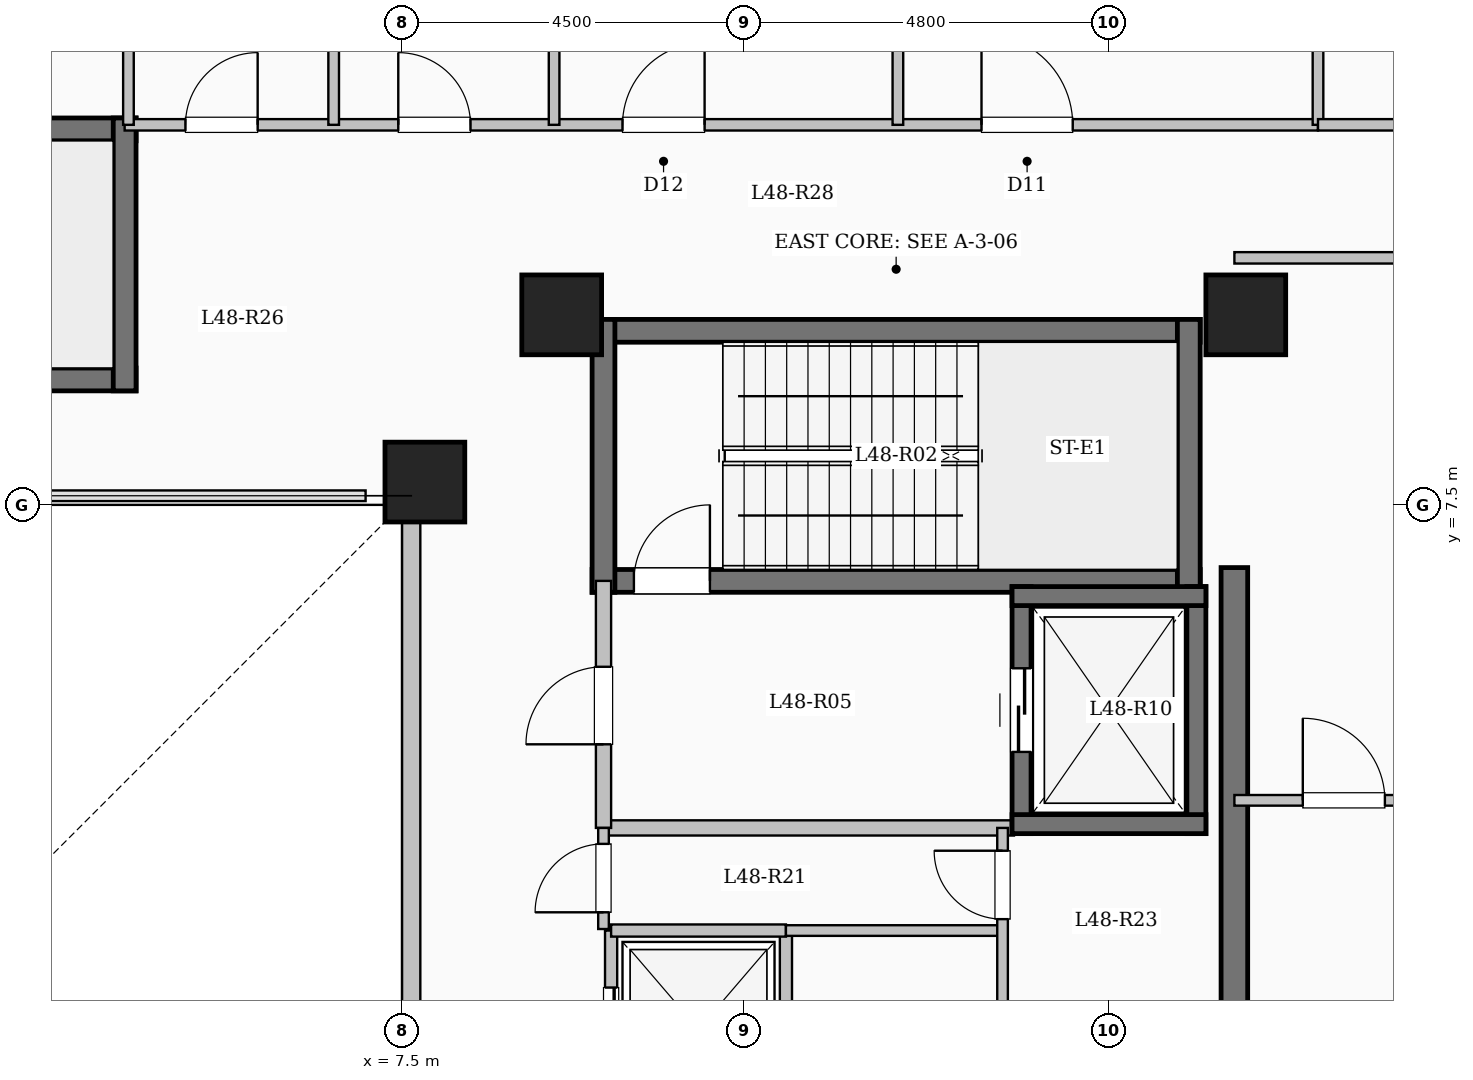
"""IFC4 building model, lengths in metres.
Left out: names, types, materials, properties, quantities, classifications, styles, units other than length and angle.
Written with IfcOpenShell. Run it as: python <this file> out.ifc"""

import sys

from ifc_helpers import new_model, si_unit, direction, frame, frame_2d, origin, origin_2d, place, context, subcontext, project, spatial, rectangle, extrude, element, fill, save


model = new_model("IFC4")
c1 = context("Model", 3, precision=1e-05, world=origin(), true_north=direction((0.0, 1.0)))
c2 = subcontext(c1, "Body", "Model", "MODEL_VIEW")
j1 = project(units=[si_unit("LENGTHUNIT", "METRE"), si_unit("PLANEANGLEUNIT", "RADIAN")], contexts=[c1])
p1 = place(None, origin())
s1 = spatial("IfcSite", under=j1, at=p1, CompositionType="ELEMENT")
p2 = place(p1, origin())
s2 = spatial("IfcBuilding", under=s1, at=p2, CompositionType="ELEMENT")
p3 = place(p2, frame((0.0, 0.0, 177.3)))
s3 = spatial("IfcBuildingStorey", under=s2, at=p3, CompositionType="ELEMENT", Elevation=177.3)
for number, where, z_axis, x_axis in (
    (1, (7.8, 7.8, 0.0), (0.0, 0.0, 1.0), (1.0, 0.0, 0.0)),
    (2, (9.6, 10.0, 0.0), (0.0, 0.0, 1.0), (1.0, 0.0, 0.0)),
    (3, (18.6, 10.0, 0.0), (0.0, 0.0, 1.0), (1.0, 0.0, 0.0)),
):
    element("IfcColumn", number, at=place(p3, frame(where, z_axis=z_axis, x_axis=x_axis)), inside=s3, PredefinedType="COLUMN", context=c2, shape_type="SweptSolid", body=[
        extrude(rectangle(XDim=1.05, YDim=1.05, at=origin_2d()), origin(), (0.0, 0.0, 1.0), 4.5),
    ])
p4 = place(p3, frame((7.62, -7.62, 0.0), z_axis=(0.0, 0.0, 1.0), x_axis=(0.0, 1.0, 0.0)))
e4 = element("IfcWall", 4, at=p4, inside=s3, PredefinedType="SOLIDWALL", context=c2, shape_type="SweptSolid", body=[
    extrude(rectangle(XDim=15.24, YDim=0.24, at=frame_2d((7.62, 0.0))), origin(), (0.0, 0.0, 1.0), 4.2),
])
p5 = place(p4, frame((6.92, 0.0, 0.95)))
e5 = element("IfcOpeningElement", 5, at=p5, cuts=e4, PredefinedType="OPENING", context=c2, shape_type="SweptSolid", body=[
    extrude(rectangle(XDim=1.4, YDim=1.5, at=frame_2d((0.7, 0.75))), frame((0.0, 0.13, 0.0), z_axis=(0.0, -1.0, 0.0), x_axis=(1.0, 0.0, 0.0)), (0.0, 0.0, 1.0), 0.26),
])
p6 = place(p3, frame((10.0, 9.79, 0.0), z_axis=(0.0, 0.0, 1.0), x_axis=(1.0, 0.0, 0.0)))
e6 = element("IfcWall", 6, at=p6, inside=s3, PredefinedType="SHEAR", context=c2, shape_type="SweptSolid", body=[
    extrude(rectangle(XDim=8.0, YDim=0.3, at=frame_2d((4.0, 0.0))), origin(), (0.0, 0.0, 1.0), 4.5),
])
p7 = place(p3, frame((10.0, 6.5, 0.0), z_axis=(0.0, 0.0, 1.0), x_axis=(1.0, 0.0, 0.0)))
e7 = element("IfcWall", 7, at=p7, inside=s3, PredefinedType="SHEAR", context=c2, shape_type="SweptSolid", body=[
    extrude(rectangle(XDim=8.0, YDim=0.3, at=frame_2d((4.0, 0.0))), origin(), (0.0, 0.0, 1.0), 4.5),
])
p8 = place(p7, frame((0.55, 0.0, 0.0)))
e8 = element("IfcOpeningElement", 8, at=p8, cuts=e7, PredefinedType="OPENING", context=c2, shape_type="SweptSolid", body=[
    extrude(rectangle(XDim=1.0, YDim=2.15, at=frame_2d((0.5, 1.075))), frame((0.0, 0.16, 0.0), z_axis=(0.0, -1.0, 0.0), x_axis=(1.0, 0.0, 0.0)), (0.0, 0.0, 1.0), 0.32),
])
for number, where, z_axis, x_axis in (
    (9, (10.15, 6.35, 0.0), (0.0, 0.0, 1.0), (0.0, 1.0, 0.0)),
    (10, (17.85, 6.35, 0.0), (0.0, 0.0, 1.0), (0.0, 1.0, 0.0)),
):
    element("IfcWall", number, at=place(p3, frame(where, z_axis=z_axis, x_axis=x_axis)), inside=s3, PredefinedType="SHEAR", context=c2, shape_type="SweptSolid", body=[
        extrude(rectangle(XDim=3.59, YDim=0.3, at=frame_2d((1.795, 0.0))), origin(), (0.0, 0.0, 1.0), 4.5),
    ])
p9 = place(p3, frame((-4.0, 12.44, 0.0), z_axis=(0.0, 0.0, 1.0), x_axis=(1.0, 0.0, 0.0)))
e11 = element("IfcWall", 11, at=p9, inside=s3, PredefinedType="SHEAR", context=c2, shape_type="SweptSolid", body=[
    extrude(rectangle(XDim=8.0, YDim=0.3, at=frame_2d((4.0, 0.0))), origin(), (0.0, 0.0, 1.0), 4.5),
])
p10 = place(p3, frame((-4.0, 9.15, 0.0), z_axis=(0.0, 0.0, 1.0), x_axis=(1.0, 0.0, 0.0)))
e12 = element("IfcWall", 12, at=p10, inside=s3, PredefinedType="SHEAR", context=c2, shape_type="SweptSolid", body=[
    extrude(rectangle(XDim=8.0, YDim=0.3, at=frame_2d((4.0, 0.0))), origin(), (0.0, 0.0, 1.0), 4.5),
])
p11 = place(p10, frame((0.55, 0.0, 0.0)))
e13 = element("IfcOpeningElement", 13, at=p11, cuts=e12, PredefinedType="OPENING", context=c2, shape_type="SweptSolid", body=[
    extrude(rectangle(XDim=1.0, YDim=2.15, at=frame_2d((0.5, 1.075))), frame((0.0, 0.16, 0.0), z_axis=(0.0, -1.0, 0.0), x_axis=(1.0, 0.0, 0.0)), (0.0, 0.0, 1.0), 0.32),
])
p12 = place(p3, frame((3.85, 9.0, 0.0), z_axis=(0.0, 0.0, 1.0), x_axis=(0.0, 1.0, 0.0)))
e14 = element("IfcWall", 14, at=p12, inside=s3, PredefinedType="SHEAR", context=c2, shape_type="SweptSolid", body=[
    extrude(rectangle(XDim=3.59, YDim=0.3, at=frame_2d((1.795, 0.0))), origin(), (0.0, 0.0, 1.0), 4.5),
])
p13 = place(p3, frame((10.15, 3.25, 0.0), z_axis=(0.0, 0.0, 1.0), x_axis=(1.0, 0.0, 0.0)))
e15 = element("IfcWall", 15, at=p13, inside=s3, PredefinedType="SOLIDWALL", context=c2, shape_type="SweptSolid", body=[
    extrude(rectangle(XDim=5.4, YDim=0.2, at=frame_2d((2.7, 0.0))), origin(), (0.0, 0.0, 1.0), 4.2),
])
p14 = place(p3, frame((10.15, 3.25, 0.0), z_axis=(0.0, 0.0, 1.0), x_axis=(0.0, 1.0, 0.0)))
e16 = element("IfcWall", 16, at=p14, inside=s3, PredefinedType="SOLIDWALL", context=c2, shape_type="SweptSolid", body=[
    extrude(rectangle(XDim=3.25, YDim=0.2, at=frame_2d((1.625, 0.0))), origin(), (0.0, 0.0, 1.0), 4.2),
])
p15 = place(p14, frame((1.1, 0.0, 0.0)))
e17 = element("IfcOpeningElement", 17, at=p15, cuts=e16, PredefinedType="OPENING", context=c2, shape_type="SweptSolid", body=[
    extrude(rectangle(XDim=1.02, YDim=2.15, at=frame_2d((0.51, 1.075))), frame((0.0, 0.11, 0.0), z_axis=(0.0, -1.0, 0.0), x_axis=(1.0, 0.0, 0.0)), (0.0, 0.0, 1.0), 0.22),
])
p16 = place(p3, frame((15.65, 3.175, 0.0), z_axis=(0.0, 0.0, 1.0), x_axis=(0.0, 1.0, 0.0)))
e18 = element("IfcWall", 18, at=p16, inside=s3, PredefinedType="SHEAR", context=c2, shape_type="SweptSolid", body=[
    extrude(rectangle(XDim=3.25, YDim=0.25, at=frame_2d((1.625, 0.0))), origin(), (0.0, 0.0, 1.0), 4.5),
])
p17 = place(p16, frame((1.075, 0.0, 0.0)))
e19 = element("IfcOpeningElement", 19, at=p17, cuts=e18, PredefinedType="OPENING", context=c2, shape_type="SweptSolid", body=[
    extrude(rectangle(XDim=1.1, YDim=2.15, at=frame_2d((0.55, 1.075))), frame((0.0, 0.135, 0.0), z_axis=(0.0, -1.0, 0.0), x_axis=(1.0, 0.0, 0.0)), (0.0, 0.0, 1.0), 0.27),
])
p18 = place(p3, frame((17.95, 3.175, 0.0), z_axis=(0.0, 0.0, 1.0), x_axis=(0.0, 1.0, 0.0)))
e20 = element("IfcWall", 20, at=p18, inside=s3, PredefinedType="SHEAR", context=c2, shape_type="SweptSolid", body=[
    extrude(rectangle(XDim=3.25, YDim=0.25, at=frame_2d((1.625, 0.0))), origin(), (0.0, 0.0, 1.0), 4.5),
])
for number, where, z_axis, x_axis in (
    (21, (15.525, 3.3, 0.0), (0.0, 0.0, 1.0), (1.0, 0.0, 0.0)),
    (22, (15.525, 6.3, 0.0), (0.0, 0.0, 1.0), (1.0, 0.0, 0.0)),
):
    element("IfcWall", number, at=place(p3, frame(where, z_axis=z_axis, x_axis=x_axis)), inside=s3, PredefinedType="SHEAR", context=c2, shape_type="SweptSolid", body=[
        extrude(rectangle(XDim=2.55, YDim=0.25, at=frame_2d((1.275, 0.0))), origin(), (0.0, 0.0, 1.0), 4.5),
    ])
p19 = place(p3, frame((10.25, -0.7, 0.0), z_axis=(0.0, 0.0, 1.0), x_axis=(0.0, 1.0, 0.0)))
e23 = element("IfcWall", 23, at=p19, inside=s3, PredefinedType="SOLIDWALL", context=c2, shape_type="SweptSolid", body=[
    extrude(rectangle(XDim=2.6, YDim=0.16, at=frame_2d((1.3, 0.0))), origin(), (0.0, 0.0, 1.0), 4.2),
])
p20 = place(p19, frame((0.75, 0.0, 0.0)))
e24 = element("IfcOpeningElement", 24, at=p20, cuts=e23, PredefinedType="OPENING", context=c2, shape_type="SweptSolid", body=[
    extrude(rectangle(XDim=1.1, YDim=2.15, at=frame_2d((0.55, 1.075))), frame((0.0, 0.09, 0.0), z_axis=(0.0, -1.0, 0.0), x_axis=(1.0, 0.0, 0.0)), (0.0, 0.0, 1.0), 0.18),
])
p21 = place(p3, frame((12.55, -0.7, 0.0), z_axis=(0.0, 0.0, 1.0), x_axis=(0.0, 1.0, 0.0)))
e25 = element("IfcWall", 25, at=p21, inside=s3, PredefinedType="SOLIDWALL", context=c2, shape_type="SweptSolid", body=[
    extrude(rectangle(XDim=2.6, YDim=0.16, at=frame_2d((1.3, 0.0))), origin(), (0.0, 0.0, 1.0), 4.2),
])
p22 = place(p3, frame((10.25, 1.9, 0.0), z_axis=(0.0, 0.0, 1.0), x_axis=(1.0, 0.0, 0.0)))
e26 = element("IfcWall", 26, at=p22, inside=s3, PredefinedType="SOLIDWALL", context=c2, shape_type="SweptSolid", body=[
    extrude(rectangle(XDim=2.3, YDim=0.16, at=frame_2d((1.15, 0.0))), origin(), (0.0, 0.0, 1.0), 4.2),
])
p23 = place(p3, frame((18.45, -7.375, 0.0), z_axis=(0.0, 0.0, 1.0), x_axis=(0.0, 1.0, 0.0)))
e27 = element("IfcWall", 27, at=p23, inside=s3, PredefinedType="SHEAR", context=c2, shape_type="SweptSolid", body=[
    extrude(rectangle(XDim=14.05, YDim=0.35, at=frame_2d((7.025, 0.0))), origin(), (0.0, 0.0, 1.0), 4.5),
])
p24 = place(p3, frame((12.55, 1.9, 0.0), z_axis=(0.0, 0.0, 1.0), x_axis=(1.0, 0.0, 0.0)))
e28 = element("IfcWall", 28, at=p24, inside=s3, PredefinedType="PARTITIONING", context=c2, shape_type="SweptSolid", body=[
    extrude(rectangle(XDim=2.85, YDim=0.14, at=frame_2d((1.425, 0.0))), origin(), (0.0, 0.0, 1.0), 4.2),
])
p25 = place(p3, frame((10.15, 1.92, 0.0), z_axis=(0.0, 0.0, 1.0), x_axis=(0.0, 1.0, 0.0)))
e29 = element("IfcWall", 29, at=p25, inside=s3, PredefinedType="PARTITIONING", context=c2, shape_type="SweptSolid", body=[
    extrude(rectangle(XDim=1.33, YDim=0.14, at=frame_2d((0.665, 0.0))), origin(), (0.0, 0.0, 1.0), 4.2),
])
p26 = place(p25, frame((0.22, 0.0, 0.0)))
e30 = element("IfcOpeningElement", 30, at=p26, cuts=e29, PredefinedType="OPENING", context=c2, shape_type="SweptSolid", body=[
    extrude(rectangle(XDim=0.9, YDim=2.08, at=frame_2d((0.45, 1.04))), frame((0.0, 0.08, 0.0), z_axis=(0.0, -1.0, 0.0), x_axis=(1.0, 0.0, 0.0)), (0.0, 0.0, 1.0), 0.16),
])
p27 = place(p3, frame((15.4, -7.2, 0.0), z_axis=(0.0, 0.0, 1.0), x_axis=(0.0, 1.0, 0.0)))
e31 = element("IfcWall", 31, at=p27, inside=s3, PredefinedType="PARTITIONING", context=c2, shape_type="SweptSolid", body=[
    extrude(rectangle(XDim=10.45, YDim=0.14, at=frame_2d((5.225, 0.0))), origin(), (0.0, 0.0, 1.0), 4.2),
])
p28 = place(p27, frame((9.25, 0.0, 0.0)))
e32 = element("IfcOpeningElement", 32, at=p28, cuts=e31, PredefinedType="OPENING", context=c2, shape_type="SweptSolid", body=[
    extrude(rectangle(XDim=0.9, YDim=2.08, at=frame_2d((0.45, 1.04))), frame((0.0, 0.08, 0.0), z_axis=(0.0, -1.0, 0.0), x_axis=(1.0, 0.0, 0.0)), (0.0, 0.0, 1.0), 0.16),
])
p29 = place(p3, frame((3.85, 12.5, 0.0), z_axis=(0.0, 0.0, 1.0), x_axis=(1.0, 0.0, 0.0)))
e33 = element("IfcWall", 33, at=p29, inside=s3, PredefinedType="PARTITIONING", context=c2, shape_type="SweptSolid", body=[
    extrude(rectangle(XDim=15.7, YDim=0.15, at=frame_2d((7.85, 0.0))), origin(), (0.0, 0.0, 1.0), 4.2),
])
p30 = place(p29, frame((0.8, 0.0, 0.0)))
e34 = element("IfcOpeningElement", 34, at=p30, cuts=e33, PredefinedType="OPENING", context=c2, shape_type="SweptSolid", body=[
    extrude(rectangle(XDim=0.95, YDim=2.15, at=frame_2d((0.475, 1.075))), frame((0.0, 0.085, 0.0), z_axis=(0.0, -1.0, 0.0), x_axis=(1.0, 0.0, 0.0)), (0.0, 0.0, 1.0), 0.17),
])
p31 = place(p29, frame((3.6, 0.0, 0.0)))
e35 = element("IfcOpeningElement", 35, at=p31, cuts=e33, PredefinedType="OPENING", context=c2, shape_type="SweptSolid", body=[
    extrude(rectangle(XDim=0.95, YDim=2.15, at=frame_2d((0.475, 1.075))), frame((0.0, 0.085, 0.0), z_axis=(0.0, -1.0, 0.0), x_axis=(1.0, 0.0, 0.0)), (0.0, 0.0, 1.0), 0.17),
])
p32 = place(p29, frame((6.55, 0.0, 0.0)))
e36 = element("IfcOpeningElement", 36, at=p32, cuts=e33, PredefinedType="OPENING", context=c2, shape_type="SweptSolid", body=[
    extrude(rectangle(XDim=1.08, YDim=2.15, at=frame_2d((0.54, 1.075))), frame((0.0, 0.085, 0.0), z_axis=(0.0, -1.0, 0.0), x_axis=(1.0, 0.0, 0.0)), (0.0, 0.0, 1.0), 0.17),
])
p33 = place(p29, frame((11.273, 0.0, 0.0)))
e37 = element("IfcOpeningElement", 37, at=p33, cuts=e33, PredefinedType="OPENING", context=c2, shape_type="SweptSolid", body=[
    extrude(rectangle(XDim=1.2, YDim=2.15, at=frame_2d((0.6, 1.075))), frame((0.0, 0.085, 0.0), z_axis=(0.0, -1.0, 0.0), x_axis=(1.0, 0.0, 0.0)), (0.0, 0.0, 1.0), 0.17),
])
p34 = place(p3, frame((3.9, 12.5, 0.0), z_axis=(0.0, 0.0, 1.0), x_axis=(0.0, 1.0, 0.0)))
e38 = element("IfcWall", 38, at=p34, inside=s3, PredefinedType="PARTITIONING", context=c2, shape_type="SweptSolid", body=[
    extrude(rectangle(XDim=10.18, YDim=0.14, at=frame_2d((5.09, 0.0))), origin(), (0.0, 0.0, 1.0), 4.2),
])
p35 = place(p3, frame((6.6, 12.5, 0.0), z_axis=(0.0, 0.0, 1.0), x_axis=(0.0, 1.0, 0.0)))
e39 = element("IfcWall", 39, at=p35, inside=s3, PredefinedType="PARTITIONING", context=c2, shape_type="SweptSolid", body=[
    extrude(rectangle(XDim=9.785, YDim=0.14, at=frame_2d((4.893, 0.0))), origin(), (0.0, 0.0, 1.0), 4.2),
])
p36 = place(p3, frame((9.5, 12.5, 0.0), z_axis=(0.0, 0.0, 1.0), x_axis=(0.0, 1.0, 0.0)))
e40 = element("IfcWall", 40, at=p36, inside=s3, PredefinedType="PARTITIONING", context=c2, shape_type="SweptSolid", body=[
    extrude(rectangle(XDim=9.07, YDim=0.14, at=frame_2d((4.535, 0.0))), origin(), (0.0, 0.0, 1.0), 4.2),
])
p37 = place(p3, frame((14.023, 12.5, 0.0), z_axis=(0.0, 0.0, 1.0), x_axis=(0.0, 1.0, 0.0)))
e41 = element("IfcWall", 41, at=p37, inside=s3, PredefinedType="PARTITIONING", context=c2, shape_type="SweptSolid", body=[
    extrude(rectangle(XDim=8.7, YDim=0.14, at=frame_2d((4.35, 0.0))), origin(), (0.0, 0.0, 1.0), 4.2),
])
p38 = place(p3, frame((18.45, 10.75, 0.0), z_axis=(0.0, 0.0, 1.0), x_axis=(1.0, 0.0, 0.0)))
e42 = element("IfcWall", 42, at=p38, inside=s3, PredefinedType="PARTITIONING", context=c2, shape_type="SweptSolid", body=[
    extrude(rectangle(XDim=6.63, YDim=0.15, at=frame_2d((3.315, 0.0))), origin(), (0.0, 0.0, 1.0), 4.2),
])
p39 = place(p3, frame((19.55, 12.5, 0.0), z_axis=(0.0, 0.0, 1.0), x_axis=(0.0, 1.0, 0.0)))
e43 = element("IfcWall", 43, at=p39, inside=s3, PredefinedType="PARTITIONING", context=c2, shape_type="SweptSolid", body=[
    extrude(rectangle(XDim=4.75, YDim=0.14, at=frame_2d((2.375, 0.0))), origin(), (0.0, 0.0, 1.0), 4.2),
])
p40 = place(p3, frame((19.55, 12.5, 0.0), z_axis=(0.0, 0.0, 1.0), x_axis=(1.0, 0.0, 0.0)))
e44 = element("IfcWall", 44, at=p40, inside=s3, PredefinedType="PARTITIONING", context=c2, shape_type="SweptSolid", body=[
    extrude(rectangle(XDim=5.53, YDim=0.15, at=frame_2d((2.765, 0.0))), origin(), (0.0, 0.0, 1.0), 4.2),
])
p41 = place(p40, frame((2.29, 0.0, 0.0)))
e45 = element("IfcOpeningElement", 45, at=p41, cuts=e44, PredefinedType="OPENING", context=c2, shape_type="SweptSolid", body=[
    extrude(rectangle(XDim=0.95, YDim=2.15, at=frame_2d((0.475, 1.075))), frame((0.0, 0.085, 0.0), z_axis=(0.0, -1.0, 0.0), x_axis=(1.0, 0.0, 0.0)), (0.0, 0.0, 1.0), 0.17),
])
p42 = place(p3, frame((18.45, 3.613, 0.0), z_axis=(0.0, 0.0, 1.0), x_axis=(1.0, 0.0, 0.0)))
e46 = element("IfcWall", 46, at=p42, inside=s3, PredefinedType="PARTITIONING", context=c2, shape_type="SweptSolid", body=[
    extrude(rectangle(XDim=6.63, YDim=0.14, at=frame_2d((3.315, 0.0))), origin(), (0.0, 0.0, 1.0), 4.2),
])
p43 = place(p42, frame((0.9, 0.0, 0.0)))
e47 = element("IfcOpeningElement", 47, at=p43, cuts=e46, PredefinedType="OPENING", context=c2, shape_type="SweptSolid", body=[
    extrude(rectangle(XDim=1.08, YDim=2.15, at=frame_2d((0.54, 1.075))), frame((0.0, 0.08, 0.0), z_axis=(0.0, -1.0, 0.0), x_axis=(1.0, 0.0, 0.0)), (0.0, 0.0, 1.0), 0.16),
])
p44 = place(p8, origin())
e48 = element("IfcDoor", 48, at=p44, inside=s3, OperationType="SINGLE_SWING_RIGHT", PredefinedType="DOOR", context=c2, shape_type="SweptSolid", body=[
    extrude(rectangle(XDim=1.0, YDim=2.15, at=frame_2d((0.5, 1.075))), frame((0.0, 0.025, 0.0), z_axis=(0.0, -1.0, 0.0), x_axis=(1.0, 0.0, 0.0)), (0.0, 0.0, 1.0), 0.05),
])
fill(e8, e48)
p45 = place(p15, origin())
e49 = element("IfcDoor", 49, at=p45, inside=s3, OperationType="SINGLE_SWING_LEFT", PredefinedType="DOOR", context=c2, shape_type="SweptSolid", body=[
    extrude(rectangle(XDim=1.02, YDim=2.15, at=frame_2d((0.51, 1.075))), frame((0.0, 0.025, 0.0), z_axis=(0.0, -1.0, 0.0), x_axis=(1.0, 0.0, 0.0)), (0.0, 0.0, 1.0), 0.05),
])
fill(e17, e49)
p46 = place(p17, origin())
e50 = element("IfcDoor", 50, at=p46, inside=s3, OperationType="SLIDING_TO_LEFT", PredefinedType="DOOR", context=c2, shape_type="SweptSolid", body=[
    extrude(rectangle(XDim=1.1, YDim=2.15, at=frame_2d((0.55, 1.075))), frame((0.0, 0.025, 0.0), z_axis=(0.0, -1.0, 0.0), x_axis=(1.0, 0.0, 0.0)), (0.0, 0.0, 1.0), 0.05),
])
fill(e19, e50)
p47 = place(p20, origin())
e51 = element("IfcDoor", 51, at=p47, inside=s3, OperationType="SLIDING_TO_LEFT", PredefinedType="DOOR", context=c2, shape_type="SweptSolid", body=[
    extrude(rectangle(XDim=1.1, YDim=2.15, at=frame_2d((0.55, 1.075))), frame((0.0, 0.025, 0.0), z_axis=(0.0, -1.0, 0.0), x_axis=(1.0, 0.0, 0.0)), (0.0, 0.0, 1.0), 0.05),
])
fill(e24, e51)
p48 = place(p26, origin())
e52 = element("IfcDoor", 52, at=p48, inside=s3, OperationType="SINGLE_SWING_LEFT", PredefinedType="DOOR", context=c2, shape_type="SweptSolid", body=[
    extrude(rectangle(XDim=0.9, YDim=2.08, at=frame_2d((0.45, 1.04))), frame((0.0, 0.025, 0.0), z_axis=(0.0, -1.0, 0.0), x_axis=(1.0, 0.0, 0.0)), (0.0, 0.0, 1.0), 0.05),
])
fill(e30, e52)
p49 = place(p28, origin())
e53 = element("IfcDoor", 53, at=p49, inside=s3, OperationType="SINGLE_SWING_RIGHT", PredefinedType="DOOR", context=c2, shape_type="SweptSolid", body=[
    extrude(rectangle(XDim=0.9, YDim=2.08, at=frame_2d((0.45, 1.04))), frame((0.0, 0.025, 0.0), z_axis=(0.0, -1.0, 0.0), x_axis=(1.0, 0.0, 0.0)), (0.0, 0.0, 1.0), 0.05),
])
fill(e32, e53)
p50 = place(p30, origin())
e54 = element("IfcDoor", 54, at=p50, inside=s3, OperationType="SINGLE_SWING_RIGHT", PredefinedType="DOOR", context=c2, shape_type="SweptSolid", body=[
    extrude(rectangle(XDim=0.95, YDim=2.15, at=frame_2d((0.475, 1.075))), frame((0.0, 0.025, 0.0), z_axis=(0.0, -1.0, 0.0), x_axis=(1.0, 0.0, 0.0)), (0.0, 0.0, 1.0), 0.05),
])
fill(e34, e54)
p51 = place(p31, origin())
e55 = element("IfcDoor", 55, at=p51, inside=s3, OperationType="SINGLE_SWING_LEFT", PredefinedType="DOOR", context=c2, shape_type="SweptSolid", body=[
    extrude(rectangle(XDim=0.95, YDim=2.15, at=frame_2d((0.475, 1.075))), frame((0.0, 0.025, 0.0), z_axis=(0.0, -1.0, 0.0), x_axis=(1.0, 0.0, 0.0)), (0.0, 0.0, 1.0), 0.05),
])
fill(e35, e55)
p52 = place(p32, origin())
e56 = element("IfcDoor", 56, at=p52, inside=s3, OperationType="SINGLE_SWING_RIGHT", PredefinedType="DOOR", context=c2, shape_type="SweptSolid", body=[
    extrude(rectangle(XDim=1.08, YDim=2.15, at=frame_2d((0.54, 1.075))), frame((0.0, 0.025, 0.0), z_axis=(0.0, -1.0, 0.0), x_axis=(1.0, 0.0, 0.0)), (0.0, 0.0, 1.0), 0.05),
])
fill(e36, e56)
p53 = place(p33, origin())
e57 = element("IfcDoor", 57, at=p53, inside=s3, OperationType="SINGLE_SWING_LEFT", PredefinedType="DOOR", context=c2, shape_type="SweptSolid", body=[
    extrude(rectangle(XDim=1.2, YDim=2.15, at=frame_2d((0.6, 1.075))), frame((0.0, 0.025, 0.0), z_axis=(0.0, -1.0, 0.0), x_axis=(1.0, 0.0, 0.0)), (0.0, 0.0, 1.0), 0.05),
])
fill(e37, e57)
p54 = place(p43, origin())
e58 = element("IfcDoor", 58, at=p54, inside=s3, OperationType="SINGLE_SWING_LEFT", PredefinedType="DOOR", context=c2, shape_type="SweptSolid", body=[
    extrude(rectangle(XDim=1.08, YDim=2.15, at=frame_2d((0.54, 1.075))), frame((0.0, 0.025, 0.0), z_axis=(0.0, -1.0, 0.0), x_axis=(1.0, 0.0, 0.0)), (0.0, 0.0, 1.0), 0.05),
])
fill(e47, e58)
save(model, sys.argv[1])
